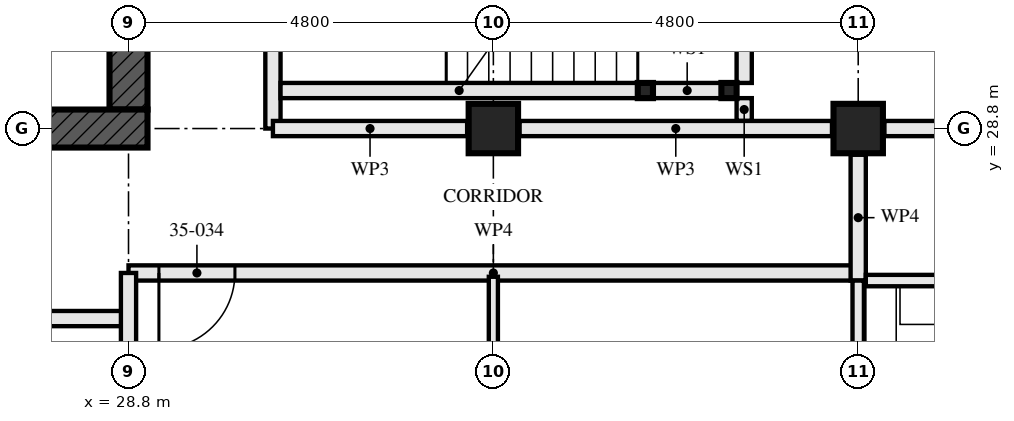
"""IFC4 building model, lengths in metres.
Left out: names, types, materials, properties, quantities, classifications, styles, units other than length and angle.
Written with IfcOpenShell. Run it as: python <this file> out.ifc"""

import sys

from ifc_helpers import new_model, si_unit, direction, frame, frame_2d, origin, origin_2d, place, context, subcontext, project, spatial, rectangle, hollow_rectangle, extrude, element, fill, save


model = new_model("IFC4")
c1 = context("Model", 3, precision=1e-05, world=origin(), true_north=direction((0.0, 1.0)))
c2 = subcontext(c1, "Body", "Model", "MODEL_VIEW")
j1 = project(units=[si_unit("LENGTHUNIT", "METRE"), si_unit("PLANEANGLEUNIT", "RADIAN")], contexts=[c1])
p1 = place(None, origin())
s1 = spatial("IfcSite", under=j1, at=p1, CompositionType="ELEMENT")
p2 = place(p1, origin())
s2 = spatial("IfcBuilding", under=s1, at=p2, CompositionType="ELEMENT")
p3 = place(p2, frame((0.0, 0.0, 129.5)))
s3 = spatial("IfcBuildingStorey", under=s2, at=p3, CompositionType="ELEMENT", Elevation=129.5)
for number, where, z_axis, x_axis in (
    (1, (33.6, 28.8, 0.0), (0.0, 0.0, 1.0), (0.0, 1.0, 0.0)),
    (2, (38.4, 28.8, 0.0), (0.0, 0.0, 1.0), (0.0, 1.0, 0.0)),
):
    element("IfcColumn", number, at=place(p3, frame(where, z_axis=z_axis, x_axis=x_axis)), inside=s3, PredefinedType="COLUMN", context=c2, shape_type="SweptSolid", body=[
        extrude(hollow_rectangle(XDim=0.65, YDim=0.65, WallThickness=0.05, at=origin_2d()), origin(), (0.0, 0.0, 1.0), 3.5),
    ])
p4 = place(p3, frame((14.15, 28.8, -0.17), z_axis=(0.0, 0.0, 1.0), x_axis=(1.0, 0.0, 0.0)))
e3 = element("IfcWall", 3, at=p4, inside=s3, PredefinedType="SHEAR", context=c2, shape_type="SweptSolid", body=[
    extrude(rectangle(XDim=14.9, YDim=0.5, at=frame_2d((7.45, 0.0))), origin(), (0.0, 0.0, 1.0), 3.5),
])
p5 = place(p4, frame((6.85, 0.0, 0.17)))
e4 = element("IfcOpeningElement", 4, at=p5, cuts=e3, PredefinedType="OPENING", context=c2, shape_type="SweptSolid", body=[
    extrude(rectangle(XDim=1.2, YDim=2.1, at=frame_2d((0.6, 1.05))), frame((0.0, 0.26, 0.0), z_axis=(0.0, -1.0, 0.0), x_axis=(1.0, 0.0, 0.0)), (0.0, 0.0, 1.0), 0.521),
])
p6 = place(p3, frame((28.8, 29.05, -0.17), z_axis=(0.0, 0.0, 1.0), x_axis=(0.0, 1.0, 0.0)))
e5 = element("IfcWall", 5, at=p6, inside=s3, PredefinedType="SHEAR", context=c2, shape_type="SweptSolid", body=[
    extrude(rectangle(XDim=13.9, YDim=0.5, at=frame_2d((6.95, 0.0))), origin(), (0.0, 0.0, 1.0), 3.5),
])
p7 = place(p6, frame((6.35, 0.0, 0.17)))
e6 = element("IfcOpeningElement", 6, at=p7, cuts=e5, PredefinedType="OPENING", context=c2, shape_type="SweptSolid", body=[
    extrude(rectangle(XDim=1.2, YDim=2.1, at=frame_2d((0.6, 1.05))), frame((0.0, 0.26, 0.0), z_axis=(0.0, -1.0, 0.0), x_axis=(1.0, 0.0, 0.0)), (0.0, 0.0, 1.0), 0.521),
])
for number, where, z_axis, x_axis in (
    (7, (36.7, 29.3, 0.0), (0.0, 0.0, 1.0), (1.0, 0.0, 0.0)),
    (8, (35.6, 29.3, 0.0), (0.0, 0.0, 1.0), (1.0, 0.0, 0.0)),
):
    element("IfcColumn", number, at=place(p3, frame(where, z_axis=z_axis, x_axis=x_axis)), inside=s3, PredefinedType="COLUMN", context=c2, shape_type="SweptSolid", body=[
        extrude(hollow_rectangle(XDim=0.2, YDim=0.2, WallThickness=0.008, at=origin_2d()), origin(), (0.0, 0.0, 1.0), 3.33),
    ])
p8 = place(p3, frame((17.8, 26.3, 0.0), z_axis=(0.0, 0.0, 1.0), x_axis=(1.0, 0.0, 0.0)))
e9 = element("IfcWall", 9, at=p8, inside=s3, PredefinedType="PARTITIONING", context=c2, shape_type="SweptSolid", body=[
    extrude(rectangle(XDim=11.0, YDim=0.2, at=frame_2d((5.5, 0.0))), origin(), (0.0, 0.0, 1.0), 2.55),
])
p9 = place(p8, frame((6.6, 0.0, 0.0)))
e10 = element("IfcOpeningElement", 10, at=p9, cuts=e9, PredefinedType="OPENING", context=c2, shape_type="SweptSolid", body=[
    extrude(rectangle(XDim=1.0, YDim=2.1, at=frame_2d((0.5, 1.05))), frame((0.0, 0.111, 0.0), z_axis=(0.0, -1.0, 0.0), x_axis=(1.0, 0.0, 0.0)), (0.0, 0.0, 1.0), 0.221),
])
p10 = place(p3, frame((38.4, 23.8, 0.0), z_axis=(0.0, 0.0, 1.0), x_axis=(0.0, 1.0, 0.0)))
e11 = element("IfcWall", 11, at=p10, inside=s3, PredefinedType="PARTITIONING", context=c2, shape_type="SweptSolid", body=[
    extrude(rectangle(XDim=3.0, YDim=0.15, at=frame_2d((1.5, 0.0))), origin(), (0.0, 0.0, 1.0), 2.55),
])
p11 = place(p10, frame((1.05, 0.0, 0.0)))
e12 = element("IfcOpeningElement", 12, at=p11, cuts=e11, PredefinedType="OPENING", context=c2, shape_type="SweptSolid", body=[
    extrude(rectangle(XDim=0.9, YDim=2.1, at=frame_2d((0.45, 1.05))), frame((0.0, 0.085, 0.0), z_axis=(0.0, -1.0, 0.0), x_axis=(1.0, 0.0, 0.0)), (0.0, 0.0, 1.0), 0.171),
])
p12 = place(p3, frame((33.6, 20.1, 0.0), z_axis=(0.0, 0.0, 1.0), x_axis=(0.0, 1.0, 0.0)))
e13 = element("IfcWall", 13, at=p12, inside=s3, PredefinedType="PARTITIONING", context=c2, shape_type="SweptSolid", body=[
    extrude(rectangle(XDim=6.75, YDim=0.12, at=frame_2d((3.375, 0.0))), origin(), (0.0, 0.0, 1.0), 2.55),
])
p13 = place(p12, frame((4.4, 0.0, 0.0)))
e14 = element("IfcOpeningElement", 14, at=p13, cuts=e13, PredefinedType="OPENING", context=c2, shape_type="SweptSolid", body=[
    extrude(rectangle(XDim=0.9, YDim=2.1, at=frame_2d((0.45, 1.05))), frame((0.0, 0.071, 0.0), z_axis=(0.0, -1.0, 0.0), x_axis=(1.0, 0.0, 0.0)), (0.0, 0.0, 1.0), 0.141),
])
p14 = place(p3, frame((28.8, 26.9, 0.0), z_axis=(0.0, 0.0, 1.0), x_axis=(1.0, 0.0, 0.0)))
e15 = element("IfcWall", 15, at=p14, inside=s3, PredefinedType="PARTITIONING", context=c2, shape_type="SweptSolid", body=[
    extrude(rectangle(XDim=9.6, YDim=0.2, at=frame_2d((4.8, 0.0))), origin(), (0.0, 0.0, 1.0), 3.33),
])
p15 = place(p14, frame((0.4, 0.0, 0.0)))
e16 = element("IfcOpeningElement", 16, at=p15, cuts=e15, PredefinedType="OPENING", context=c2, shape_type="SweptSolid", body=[
    extrude(rectangle(XDim=1.0, YDim=2.1, at=frame_2d((0.5, 1.05))), frame((0.0, 0.111, 0.0), z_axis=(0.0, -1.0, 0.0), x_axis=(1.0, 0.0, 0.0)), (0.0, 0.0, 1.0), 0.221),
])
p16 = place(p3, frame((38.4, 26.8, 0.0), z_axis=(0.0, 0.0, 1.0), x_axis=(0.0, 1.0, 0.0)))
e17 = element("IfcWall", 17, at=p16, inside=s3, PredefinedType="PARTITIONING", context=c2, shape_type="SweptSolid", body=[
    extrude(rectangle(XDim=1.655, YDim=0.2, at=frame_2d((0.828, 0.0))), origin(), (0.0, 0.0, 1.0), 3.33),
])
p17 = place(p3, frame((36.6, 29.3, 0.0), z_axis=(0.0, 0.0, 1.0), x_axis=(-1.0, 0.0, 0.0)))
e18 = element("IfcWall", 18, at=p17, inside=s3, PredefinedType="SOLIDWALL", context=c2, shape_type="SweptSolid", body=[
    extrude(rectangle(XDim=0.9, YDim=0.2, at=frame_2d((0.45, 0.0))), origin(), (0.0, 0.0, 1.0), 2.99),
])
p18 = place(p3, frame((35.5, 29.3, 0.0), z_axis=(0.0, 0.0, 1.0), x_axis=(-1.0, 0.0, 0.0)))
e19 = element("IfcWall", 19, at=p18, inside=s3, PredefinedType="SOLIDWALL", context=c2, shape_type="SweptSolid", body=[
    extrude(rectangle(XDim=4.7, YDim=0.2, at=frame_2d((2.35, 0.0))), origin(), (0.0, 0.0, 1.0), 2.99),
])
p19 = place(p3, frame((36.9, 28.9, 0.0), z_axis=(0.0, 0.0, 1.0), x_axis=(0.0, 1.0, 0.0)))
e20 = element("IfcWall", 20, at=p19, inside=s3, PredefinedType="SOLIDWALL", context=c2, shape_type="SweptSolid", body=[
    extrude(rectangle(XDim=0.3, YDim=0.2, at=frame_2d((0.15, 0.0))), origin(), (0.0, 0.0, 1.0), 3.33),
])
p20 = place(p3, frame((36.9, 29.4, 0.0), z_axis=(0.0, 0.0, 1.0), x_axis=(0.0, 1.0, 0.0)))
e21 = element("IfcWall", 21, at=p20, inside=s3, PredefinedType="SOLIDWALL", context=c2, shape_type="SweptSolid", body=[
    extrude(rectangle(XDim=2.6, YDim=0.2, at=frame_2d((1.3, 0.0))), origin(), (0.0, 0.0, 1.0), 3.33),
])
p21 = place(p3, frame((30.7, 28.8, 0.0), z_axis=(0.0, 0.0, 1.0), x_axis=(0.0, 1.0, 0.0)))
e22 = element("IfcWall", 22, at=p21, inside=s3, PredefinedType="PARTITIONING", context=c2, shape_type="SweptSolid", body=[
    extrude(rectangle(XDim=14.84, YDim=0.2, at=frame_2d((7.42, 0.0))), origin(), (0.0, 0.0, 1.0), 2.32),
])
p22 = place(p21, frame((1.4, 0.0, 0.0)))
e23 = element("IfcOpeningElement", 23, at=p22, cuts=e22, PredefinedType="OPENING", context=c2, shape_type="SweptSolid", body=[
    extrude(rectangle(XDim=1.0, YDim=2.1, at=frame_2d((0.5, 1.05))), frame((0.0, 0.111, 0.0), z_axis=(0.0, -1.0, 0.0), x_axis=(1.0, 0.0, 0.0)), (0.0, 0.0, 1.0), 0.221),
])
p23 = place(p21, frame((4.1, 0.0, 0.0)))
e24 = element("IfcOpeningElement", 24, at=p23, cuts=e22, PredefinedType="OPENING", context=c2, shape_type="SweptSolid", body=[
    extrude(rectangle(XDim=1.0, YDim=2.1, at=frame_2d((0.5, 1.05))), frame((0.0, 0.111, 0.0), z_axis=(0.0, -1.0, 0.0), x_axis=(1.0, 0.0, 0.0)), (0.0, 0.0, 1.0), 0.221),
])
p24 = place(p21, frame((5.975, 0.0, 0.0)))
e25 = element("IfcOpeningElement", 25, at=p24, cuts=e22, PredefinedType="OPENING", context=c2, shape_type="SweptSolid", body=[
    extrude(rectangle(XDim=1.0, YDim=2.1, at=frame_2d((0.5, 1.05))), frame((0.0, 0.111, 0.0), z_axis=(0.0, -1.0, 0.0), x_axis=(1.0, 0.0, 0.0)), (0.0, 0.0, 1.0), 0.221),
])
p25 = place(p21, frame((13.0, 0.0, 0.0)))
e26 = element("IfcOpeningElement", 26, at=p25, cuts=e22, PredefinedType="OPENING", context=c2, shape_type="SweptSolid", body=[
    extrude(rectangle(XDim=1.0, YDim=2.1, at=frame_2d((0.5, 1.05))), frame((0.0, 0.111, 0.0), z_axis=(0.0, -1.0, 0.0), x_axis=(1.0, 0.0, 0.0)), (0.0, 0.0, 1.0), 0.221),
])
p26 = place(p3, frame((28.8, 24.345, 0.0), z_axis=(0.0, 0.0, 1.0), x_axis=(0.0, 1.0, 0.0)))
e27 = element("IfcWall", 27, at=p26, inside=s3, PredefinedType="PARTITIONING", context=c2, shape_type="SweptSolid", body=[
    extrude(rectangle(XDim=2.555, YDim=0.2, at=frame_2d((1.277, 0.0))), origin(), (0.0, 0.0, 1.0), 2.32),
])
p27 = place(p3, frame((42.88, 28.8, 0.0), z_axis=(0.0, 0.0, 1.0), x_axis=(-1.0, 0.0, 0.0)))
e28 = element("IfcWall", 28, at=p27, inside=s3, PredefinedType="PARTITIONING", context=c2, shape_type="SweptSolid", body=[
    extrude(rectangle(XDim=4.135, YDim=0.2, at=frame_2d((2.067, 0.0))), origin(), (0.0, 0.0, 1.0), 2.32),
])
p28 = place(p3, frame((38.055, 28.8, 0.0), z_axis=(0.0, 0.0, 1.0), x_axis=(-1.0, 0.0, 0.0)))
e29 = element("IfcWall", 29, at=p28, inside=s3, PredefinedType="PARTITIONING", context=c2, shape_type="SweptSolid", body=[
    extrude(rectangle(XDim=4.11, YDim=0.2, at=frame_2d((2.055, 0.0))), origin(), (0.0, 0.0, 1.0), 2.32),
])
p29 = place(p3, frame((33.255, 28.8, 0.0), z_axis=(0.0, 0.0, 1.0), x_axis=(-1.0, 0.0, 0.0)))
e30 = element("IfcWall", 30, at=p29, inside=s3, PredefinedType="PARTITIONING", context=c2, shape_type="SweptSolid", body=[
    extrude(rectangle(XDim=2.555, YDim=0.2, at=frame_2d((1.277, 0.0))), origin(), (0.0, 0.0, 1.0), 2.32),
])
p30 = place(p3, frame((38.5, 26.8, 0.0), z_axis=(0.0, 0.0, 1.0), x_axis=(1.0, 0.0, 0.0)))
e31 = element("IfcWall", 31, at=p30, inside=s3, PredefinedType="PARTITIONING", context=c2, shape_type="SweptSolid", body=[
    extrude(rectangle(XDim=5.14, YDim=0.15, at=frame_2d((2.57, 0.0))), origin(), (0.0, 0.0, 1.0), 2.32),
])
p31 = place(p15, frame((1.0, 0.0, 0.0), z_axis=(0.0, 0.0, 1.0), x_axis=(-1.0, 0.0, 0.0)))
e32 = element("IfcDoor", 32, at=p31, inside=s3, OperationType="SINGLE_SWING_LEFT", PredefinedType="DOOR", context=c2, shape_type="SweptSolid", body=[
    extrude(rectangle(XDim=1.0, YDim=2.1, at=frame_2d((0.5, 1.05))), frame((0.0, 0.027, 0.0), z_axis=(0.0, -1.0, 0.0), x_axis=(1.0, 0.0, 0.0)), (0.0, 0.0, 1.0), 0.054),
])
fill(e16, e32)
save(model, sys.argv[1])
